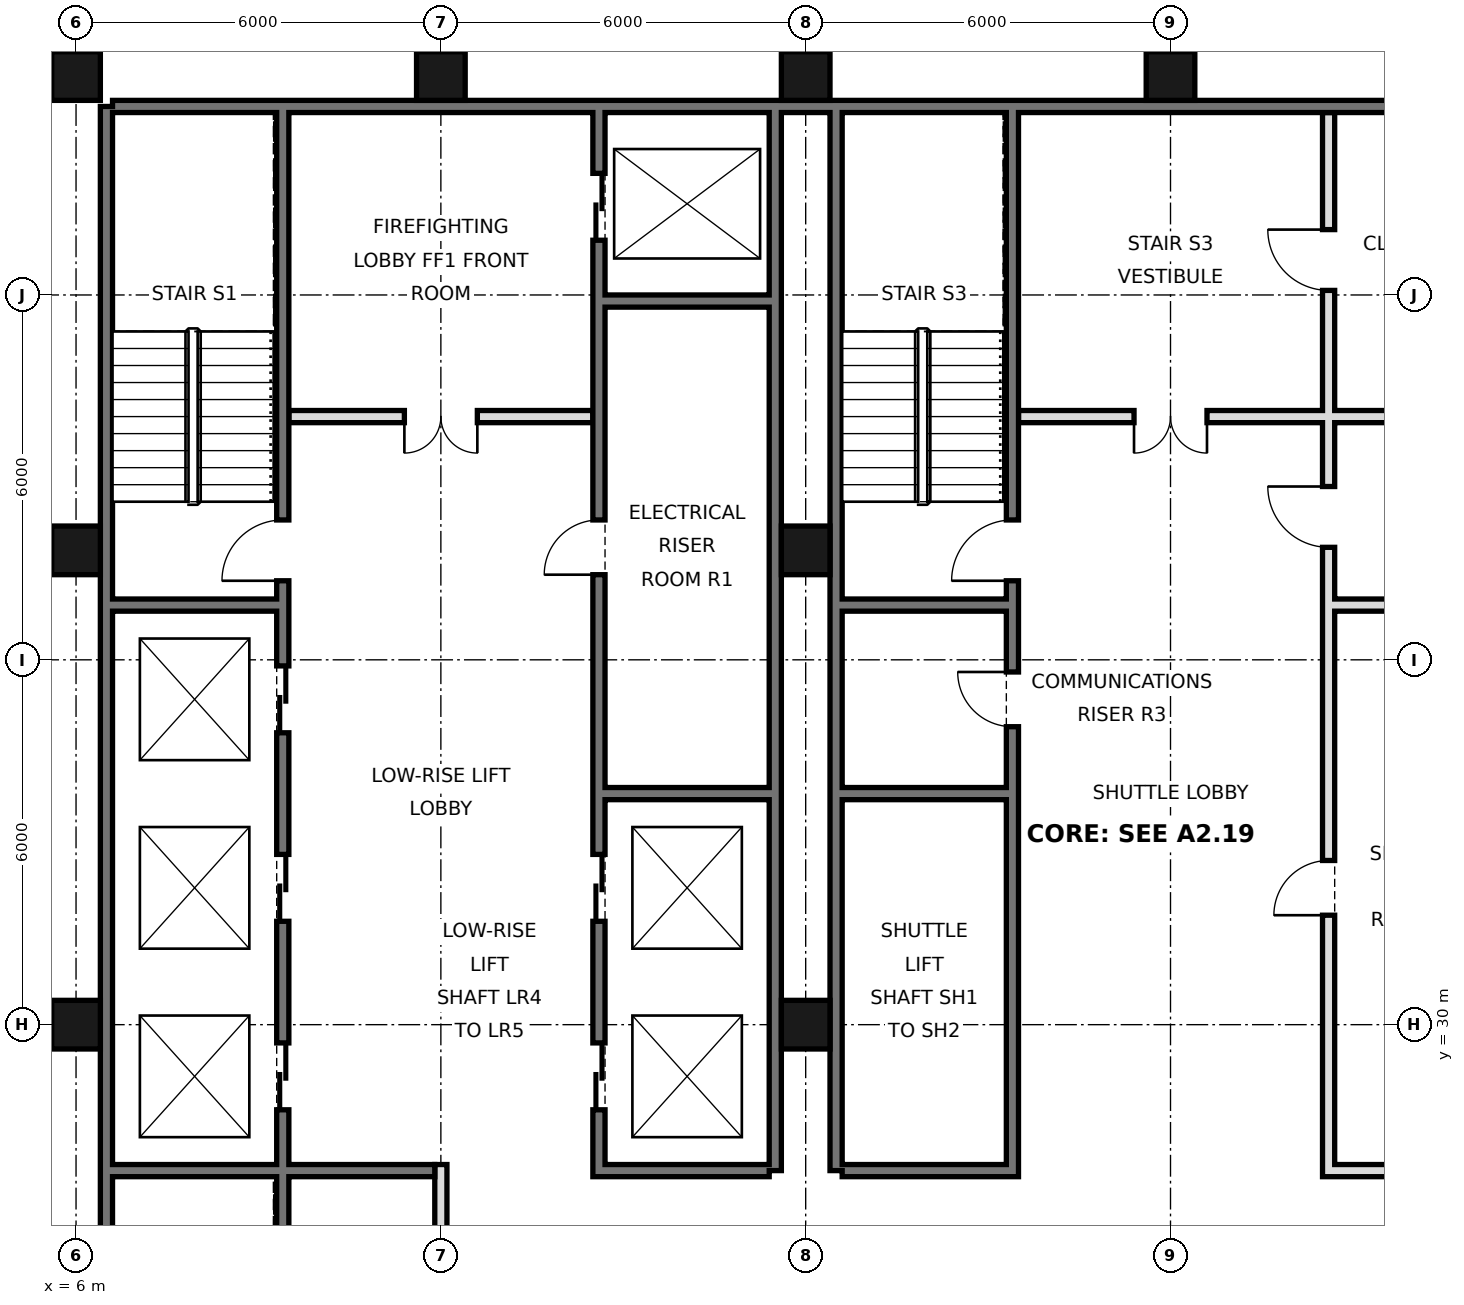
"""IFC4 building model, lengths in metres.
Left out: names, types, materials, properties, quantities, classifications, styles, units other than length and angle.
Written with IfcOpenShell. Run it as: python <this file> out.ifc"""

import sys

from ifc_helpers import new_model, si_unit, direction, frame, frame_2d, origin, origin_2d, place, context, subcontext, project, spatial, rectangle, hollow_rectangle, extrude, element, fill, save


model = new_model("IFC4")
c1 = context("Model", 3, precision=1e-05, world=origin(), true_north=direction((0.0, 1.0)))
c2 = subcontext(c1, "Body", "Model", "MODEL_VIEW")
j1 = project(units=[si_unit("LENGTHUNIT", "METRE"), si_unit("PLANEANGLEUNIT", "RADIAN")], contexts=[c1])
p1 = place(None, origin())
s1 = spatial("IfcSite", under=j1, at=p1, CompositionType="ELEMENT")
p2 = place(p1, origin())
s2 = spatial("IfcBuilding", under=s1, at=p2, CompositionType="ELEMENT")
p3 = place(p2, frame((0.0, 0.0, 75.0)))
s3 = spatial("IfcBuildingStorey", under=s2, at=p3, CompositionType="ELEMENT", Elevation=75.0)
for number, where, z_axis, x_axis in (
    (1, (6.0, 30.0, 0.0), (0.0, 0.0, 1.0), (1.0, 0.0, 0.0)),
    (2, (6.0, 37.8, 0.0), (0.0, 0.0, 1.0), (1.0, 0.0, 0.0)),
    (3, (6.0, 45.6, 0.0), (0.0, 0.0, 1.0), (1.0, 0.0, 0.0)),
    (4, (12.0, 45.6, 0.0), (0.0, 0.0, 1.0), (1.0, 0.0, 0.0)),
    (5, (18.0, 30.0, 0.0), (0.0, 0.0, 1.0), (1.0, 0.0, 0.0)),
    (6, (18.0, 37.8, 0.0), (0.0, 0.0, 1.0), (1.0, 0.0, 0.0)),
    (7, (18.0, 45.6, 0.0), (0.0, 0.0, 1.0), (1.0, 0.0, 0.0)),
    (8, (24.0, 45.6, 0.0), (0.0, 0.0, 1.0), (1.0, 0.0, 0.0)),
):
    element("IfcColumn", number, at=place(p3, frame(where, z_axis=z_axis, x_axis=x_axis)), inside=s3, PredefinedType="COLUMN", context=c2, shape_type="SweptSolid", body=[
        extrude(hollow_rectangle(XDim=0.8, YDim=0.8, WallThickness=0.06, at=origin_2d()), origin(), (0.0, 0.0, 1.0), 3.6),
    ])
p4 = place(p3, frame((6.5, 21.6, 0.0), z_axis=(0.0, 0.0, 1.0), x_axis=(0.0, 1.0, 0.0)))
e9 = element("IfcWall", 9, at=p4, inside=s3, PredefinedType="SOLIDWALL", context=c2, shape_type="SweptSolid", body=[
    extrude(rectangle(XDim=23.5, YDim=0.2, at=frame_2d((11.75, 0.0))), origin(), (0.0, 0.0, 1.0), 3.42),
])
p5 = place(p3, frame((6.6, 45.1, 0.0), z_axis=(0.0, 0.0, 1.0), x_axis=(1.0, 0.0, 0.0)))
e10 = element("IfcWall", 10, at=p5, inside=s3, PredefinedType="SOLIDWALL", context=c2, shape_type="SweptSolid", body=[
    extrude(rectangle(XDim=34.8, YDim=0.2, at=frame_2d((17.4, 0.0))), origin(), (0.0, 0.0, 1.0), 3.42),
])
for number, where, z_axis, x_axis in (
    (11, (17.5, 27.6, 0.0), (0.0, 0.0, 1.0), (0.0, 1.0, 0.0)),
    (12, (18.5, 27.6, 0.0), (0.0, 0.0, 1.0), (0.0, 1.0, 0.0)),
):
    element("IfcWall", number, at=place(p3, frame(where, z_axis=z_axis, x_axis=x_axis)), inside=s3, PredefinedType="SOLIDWALL", context=c2, shape_type="SweptSolid", body=[
        extrude(rectangle(XDim=17.5, YDim=0.2, at=frame_2d((8.75, 0.0))), origin(), (0.0, 0.0, 1.0), 3.42),
    ])
p6 = place(p3, frame((12.0, 21.6, 0.0), z_axis=(0.0, 0.0, 1.0), x_axis=(0.0, 1.0, 0.0)))
e13 = element("IfcWall", 13, at=p6, inside=s3, PredefinedType="PARTITIONING", context=c2, shape_type="SweptSolid", body=[
    extrude(rectangle(XDim=6.1, YDim=0.2, at=frame_2d((3.05, 0.0))), origin(), (0.0, 0.0, 1.0), 3.42),
])
p7 = place(p3, frame((14.6, 27.5, 0.0), z_axis=(0.0, 0.0, 1.0), x_axis=(0.0, 1.0, 0.0)))
e14 = element("IfcWall", 14, at=p7, inside=s3, PredefinedType="SOLIDWALL", context=c2, shape_type="SweptSolid", body=[
    extrude(rectangle(XDim=17.5, YDim=0.2, at=frame_2d((8.75, 0.0))), origin(), (0.0, 0.0, 1.0), 3.42),
])
p8 = place(p7, frame((1.1, 0.0, 0.0)))
e15 = element("IfcOpeningElement", 15, at=p8, cuts=e14, PredefinedType="OPENING", context=c2, shape_type="SweptSolid", body=[
    extrude(rectangle(XDim=1.1, YDim=2.1, at=frame_2d((0.55, 1.05))), frame((0.0, 0.11, 0.0), z_axis=(0.0, -1.0, 0.0), x_axis=(1.0, 0.0, 0.0)), (0.0, 0.0, 1.0), 0.22),
])
p9 = place(p7, frame((4.2, 0.0, 0.0)))
e16 = element("IfcOpeningElement", 16, at=p9, cuts=e14, PredefinedType="OPENING", context=c2, shape_type="SweptSolid", body=[
    extrude(rectangle(XDim=1.1, YDim=2.1, at=frame_2d((0.55, 1.05))), frame((0.0, 0.11, 0.0), z_axis=(0.0, -1.0, 0.0), x_axis=(1.0, 0.0, 0.0)), (0.0, 0.0, 1.0), 0.22),
])
p10 = place(p7, frame((15.4, 0.0, 0.0)))
e17 = element("IfcOpeningElement", 17, at=p10, cuts=e14, PredefinedType="OPENING", context=c2, shape_type="SweptSolid", body=[
    extrude(rectangle(XDim=1.1, YDim=2.1, at=frame_2d((0.55, 1.05))), frame((0.0, 0.11, 0.0), z_axis=(0.0, -1.0, 0.0), x_axis=(1.0, 0.0, 0.0)), (0.0, 0.0, 1.0), 0.22),
])
p11 = place(p7, frame((9.9, 0.0, 0.0)))
e18 = element("IfcOpeningElement", 18, at=p11, cuts=e14, PredefinedType="OPENING", context=c2, shape_type="SweptSolid", body=[
    extrude(rectangle(XDim=0.9, YDim=2.1, at=frame_2d((0.45, 1.05))), frame((0.0, 0.11, 0.0), z_axis=(0.0, -1.0, 0.0), x_axis=(1.0, 0.0, 0.0)), (0.0, 0.0, 1.0), 0.22),
])
p12 = place(p3, frame((21.4, 27.5, 0.0), z_axis=(0.0, 0.0, 1.0), x_axis=(0.0, 1.0, 0.0)))
e19 = element("IfcWall", 19, at=p12, inside=s3, PredefinedType="SOLIDWALL", context=c2, shape_type="SweptSolid", body=[
    extrude(rectangle(XDim=17.5, YDim=0.2, at=frame_2d((8.75, 0.0))), origin(), (0.0, 0.0, 1.0), 3.42),
])
p13 = place(p12, frame((9.8, 0.0, 0.0)))
e20 = element("IfcOpeningElement", 20, at=p13, cuts=e19, PredefinedType="OPENING", context=c2, shape_type="SweptSolid", body=[
    extrude(rectangle(XDim=1.0, YDim=2.1, at=frame_2d((0.5, 1.05))), frame((0.0, 0.11, 0.0), z_axis=(0.0, -1.0, 0.0), x_axis=(1.0, 0.0, 0.0)), (0.0, 0.0, 1.0), 0.22),
])
p14 = place(p12, frame((7.4, 0.0, 0.0)))
e21 = element("IfcOpeningElement", 21, at=p14, cuts=e19, PredefinedType="OPENING", context=c2, shape_type="SweptSolid", body=[
    extrude(rectangle(XDim=0.9, YDim=2.1, at=frame_2d((0.45, 1.05))), frame((0.0, 0.11, 0.0), z_axis=(0.0, -1.0, 0.0), x_axis=(1.0, 0.0, 0.0)), (0.0, 0.0, 1.0), 0.22),
])
p15 = place(p3, frame((26.6, 27.5, 0.0), z_axis=(0.0, 0.0, 1.0), x_axis=(0.0, 1.0, 0.0)))
e22 = element("IfcWall", 22, at=p15, inside=s3, PredefinedType="SOLIDWALL", context=c2, shape_type="SweptSolid", body=[
    extrude(rectangle(XDim=17.5, YDim=0.2, at=frame_2d((8.75, 0.0))), origin(), (0.0, 0.0, 1.0), 3.42),
])
p16 = place(p15, frame((4.3, 0.0, 0.0)))
e23 = element("IfcOpeningElement", 23, at=p16, cuts=e22, PredefinedType="OPENING", context=c2, shape_type="SweptSolid", body=[
    extrude(rectangle(XDim=0.9, YDim=2.1, at=frame_2d((0.45, 1.05))), frame((0.0, 0.11, 0.0), z_axis=(0.0, -1.0, 0.0), x_axis=(1.0, 0.0, 0.0)), (0.0, 0.0, 1.0), 0.22),
])
p17 = place(p15, frame((10.35, 0.0, 0.0)))
e24 = element("IfcOpeningElement", 24, at=p17, cuts=e22, PredefinedType="OPENING", context=c2, shape_type="SweptSolid", body=[
    extrude(rectangle(XDim=1.0, YDim=2.1, at=frame_2d((0.5, 1.05))), frame((0.0, 0.11, 0.0), z_axis=(0.0, -1.0, 0.0), x_axis=(1.0, 0.0, 0.0)), (0.0, 0.0, 1.0), 0.22),
])
p18 = place(p15, frame((14.575, 0.0, 0.0)))
e25 = element("IfcOpeningElement", 25, at=p18, cuts=e22, PredefinedType="OPENING", context=c2, shape_type="SweptSolid", body=[
    extrude(rectangle(XDim=1.0, YDim=2.1, at=frame_2d((0.5, 1.05))), frame((0.0, 0.11, 0.0), z_axis=(0.0, -1.0, 0.0), x_axis=(1.0, 0.0, 0.0)), (0.0, 0.0, 1.0), 0.22),
])
p19 = place(p3, frame((9.4, 21.6, 0.0), z_axis=(0.0, 0.0, 1.0), x_axis=(0.0, 1.0, 0.0)))
e26 = element("IfcWall", 26, at=p19, inside=s3, PredefinedType="SOLIDWALL", context=c2, shape_type="SweptSolid", body=[
    extrude(rectangle(XDim=23.4, YDim=0.2, at=frame_2d((11.7, 0.0))), origin(), (0.0, 0.0, 1.0), 3.42),
])
p20 = place(p19, frame((7.0, 0.0, 0.0)))
e27 = element("IfcOpeningElement", 27, at=p20, cuts=e26, PredefinedType="OPENING", context=c2, shape_type="SweptSolid", body=[
    extrude(rectangle(XDim=1.1, YDim=2.1, at=frame_2d((0.55, 1.05))), frame((0.0, 0.11, 0.0), z_axis=(0.0, -1.0, 0.0), x_axis=(1.0, 0.0, 0.0)), (0.0, 0.0, 1.0), 0.22),
])
p21 = place(p19, frame((10.1, 0.0, 0.0)))
e28 = element("IfcOpeningElement", 28, at=p21, cuts=e26, PredefinedType="OPENING", context=c2, shape_type="SweptSolid", body=[
    extrude(rectangle(XDim=1.1, YDim=2.1, at=frame_2d((0.55, 1.05))), frame((0.0, 0.11, 0.0), z_axis=(0.0, -1.0, 0.0), x_axis=(1.0, 0.0, 0.0)), (0.0, 0.0, 1.0), 0.22),
])
p22 = place(p19, frame((13.2, 0.0, 0.0)))
e29 = element("IfcOpeningElement", 29, at=p22, cuts=e26, PredefinedType="OPENING", context=c2, shape_type="SweptSolid", body=[
    extrude(rectangle(XDim=1.1, YDim=2.1, at=frame_2d((0.55, 1.05))), frame((0.0, 0.11, 0.0), z_axis=(0.0, -1.0, 0.0), x_axis=(1.0, 0.0, 0.0)), (0.0, 0.0, 1.0), 0.22),
])
p23 = place(p19, frame((15.7, 0.0, 0.0)))
e30 = element("IfcOpeningElement", 30, at=p23, cuts=e26, PredefinedType="OPENING", context=c2, shape_type="SweptSolid", body=[
    extrude(rectangle(XDim=1.0, YDim=2.1, at=frame_2d((0.5, 1.05))), frame((0.0, 0.11, 0.0), z_axis=(0.0, -1.0, 0.0), x_axis=(1.0, 0.0, 0.0)), (0.0, 0.0, 1.0), 0.22),
])
p24 = place(p19, frame((0.175, 0.0, 0.0)))
e31 = element("IfcOpeningElement", 31, at=p24, cuts=e26, PredefinedType="OPENING", context=c2, shape_type="SweptSolid", body=[
    extrude(rectangle(XDim=0.9, YDim=2.1, at=frame_2d((0.45, 1.05))), frame((0.0, 0.11, 0.0), z_axis=(0.0, -1.0, 0.0), x_axis=(1.0, 0.0, 0.0)), (0.0, 0.0, 1.0), 0.22),
])
for number, where, z_axis, x_axis in (
    (32, (14.7, 27.6, 0.0), (0.0, 0.0, 1.0), (1.0, 0.0, 0.0)),
    (33, (18.6, 27.6, 0.0), (0.0, 0.0, 1.0), (1.0, 0.0, 0.0)),
    (34, (26.7, 27.6, 0.0), (0.0, 0.0, 1.0), (1.0, 0.0, 0.0)),
):
    element("IfcWall", number, at=place(p3, frame(where, z_axis=z_axis, x_axis=x_axis)), inside=s3, PredefinedType="SOLIDWALL", context=c2, shape_type="SweptSolid", body=[
        extrude(rectangle(XDim=2.7, YDim=0.2, at=frame_2d((1.35, 0.0))), origin(), (0.0, 0.0, 1.0), 3.42),
    ])
p25 = place(p3, frame((6.6, 27.6, 0.0), z_axis=(0.0, 0.0, 1.0), x_axis=(1.0, 0.0, 0.0)))
e35 = element("IfcWall", 35, at=p25, inside=s3, PredefinedType="SOLIDWALL", context=c2, shape_type="SweptSolid", body=[
    extrude(rectangle(XDim=5.3, YDim=0.2, at=frame_2d((2.65, 0.0))), origin(), (0.0, 0.0, 1.0), 3.42),
])
for number, where, z_axis, x_axis in (
    (36, (14.7, 33.8, 0.0), (0.0, 0.0, 1.0), (1.0, 0.0, 0.0)),
    (37, (18.6, 33.8, 0.0), (0.0, 0.0, 1.0), (1.0, 0.0, 0.0)),
    (38, (18.6, 36.9, 0.0), (0.0, 0.0, 1.0), (1.0, 0.0, 0.0)),
    (39, (26.7, 36.9, 0.0), (0.0, 0.0, 1.0), (1.0, 0.0, 0.0)),
    (40, (6.6, 36.9, 0.0), (0.0, 0.0, 1.0), (1.0, 0.0, 0.0)),
):
    element("IfcWall", number, at=place(p3, frame(where, z_axis=z_axis, x_axis=x_axis)), inside=s3, PredefinedType="SOLIDWALL", context=c2, shape_type="SweptSolid", body=[
        extrude(rectangle(XDim=2.7, YDim=0.2, at=frame_2d((1.35, 0.0))), origin(), (0.0, 0.0, 1.0), 3.42),
    ])
p26 = place(p3, frame((21.5, 40.0, 0.0), z_axis=(0.0, 0.0, 1.0), x_axis=(1.0, 0.0, 0.0)))
e41 = element("IfcWall", 41, at=p26, inside=s3, PredefinedType="PARTITIONING", context=c2, shape_type="SweptSolid", body=[
    extrude(rectangle(XDim=7.9, YDim=0.2, at=frame_2d((3.95, 0.0))), origin(), (0.0, 0.0, 1.0), 3.42),
])
p27 = place(p26, frame((1.9, 0.0, 0.0)))
e42 = element("IfcOpeningElement", 42, at=p27, cuts=e41, PredefinedType="OPENING", context=c2, shape_type="SweptSolid", body=[
    extrude(rectangle(XDim=1.2, YDim=2.1, at=frame_2d((0.6, 1.05))), frame((0.0, 0.11, 0.0), z_axis=(0.0, -1.0, 0.0), x_axis=(1.0, 0.0, 0.0)), (0.0, 0.0, 1.0), 0.22),
])
p28 = place(p3, frame((9.5, 40.0, 0.0), z_axis=(0.0, 0.0, 1.0), x_axis=(1.0, 0.0, 0.0)))
e43 = element("IfcWall", 43, at=p28, inside=s3, PredefinedType="PARTITIONING", context=c2, shape_type="SweptSolid", body=[
    extrude(rectangle(XDim=5.0, YDim=0.2, at=frame_2d((2.5, 0.0))), origin(), (0.0, 0.0, 1.0), 3.42),
])
p29 = place(p28, frame((1.9, 0.0, 0.0)))
e44 = element("IfcOpeningElement", 44, at=p29, cuts=e43, PredefinedType="OPENING", context=c2, shape_type="SweptSolid", body=[
    extrude(rectangle(XDim=1.2, YDim=2.1, at=frame_2d((0.6, 1.05))), frame((0.0, 0.11, 0.0), z_axis=(0.0, -1.0, 0.0), x_axis=(1.0, 0.0, 0.0)), (0.0, 0.0, 1.0), 0.22),
])
p30 = place(p3, frame((14.7, 41.9, 0.0), z_axis=(0.0, 0.0, 1.0), x_axis=(1.0, 0.0, 0.0)))
e45 = element("IfcWall", 45, at=p30, inside=s3, PredefinedType="SOLIDWALL", context=c2, shape_type="SweptSolid", body=[
    extrude(rectangle(XDim=2.7, YDim=0.2, at=frame_2d((1.35, 0.0))), origin(), (0.0, 0.0, 1.0), 3.42),
])
p31 = place(p29, frame((1.2, 0.0, 0.0), z_axis=(0.0, 0.0, 1.0), x_axis=(-1.0, 0.0, 0.0)))
e46 = element("IfcDoor", 46, at=p31, inside=s3, OperationType="DOUBLE_DOOR_SINGLE_SWING", PredefinedType="DOOR", context=c2, shape_type="SweptSolid", body=[
    extrude(rectangle(XDim=1.2, YDim=2.1, at=frame_2d((0.6, 1.05))), frame((0.0, 0.025, 0.0), z_axis=(0.0, -1.0, 0.0), x_axis=(1.0, 0.0, 0.0)), (0.0, 0.0, 1.0), 0.05),
])
fill(e44, e46)
p32 = place(p27, frame((1.2, 0.0, 0.0), z_axis=(0.0, 0.0, 1.0), x_axis=(-1.0, 0.0, 0.0)))
e47 = element("IfcDoor", 47, at=p32, inside=s3, OperationType="DOUBLE_DOOR_SINGLE_SWING", PredefinedType="DOOR", context=c2, shape_type="SweptSolid", body=[
    extrude(rectangle(XDim=1.2, YDim=2.1, at=frame_2d((0.6, 1.05))), frame((0.0, 0.025, 0.0), z_axis=(0.0, -1.0, 0.0), x_axis=(1.0, 0.0, 0.0)), (0.0, 0.0, 1.0), 0.05),
])
fill(e42, e47)
p33 = place(p8, origin())
e48 = element("IfcDoor", 48, at=p33, inside=s3, OperationType="DOUBLE_DOOR_SLIDING", PredefinedType="DOOR", context=c2, shape_type="SweptSolid", body=[
    extrude(rectangle(XDim=1.1, YDim=2.1, at=frame_2d((0.55, 1.05))), frame((0.0, 0.025, 0.0), z_axis=(0.0, -1.0, 0.0), x_axis=(1.0, 0.0, 0.0)), (0.0, 0.0, 1.0), 0.05),
])
fill(e15, e48)
p34 = place(p9, origin())
e49 = element("IfcDoor", 49, at=p34, inside=s3, OperationType="DOUBLE_DOOR_SLIDING", PredefinedType="DOOR", context=c2, shape_type="SweptSolid", body=[
    extrude(rectangle(XDim=1.1, YDim=2.1, at=frame_2d((0.55, 1.05))), frame((0.0, 0.025, 0.0), z_axis=(0.0, -1.0, 0.0), x_axis=(1.0, 0.0, 0.0)), (0.0, 0.0, 1.0), 0.05),
])
fill(e16, e49)
p35 = place(p10, origin())
e50 = element("IfcDoor", 50, at=p35, inside=s3, OperationType="DOUBLE_DOOR_SLIDING", PredefinedType="DOOR", context=c2, shape_type="SweptSolid", body=[
    extrude(rectangle(XDim=1.1, YDim=2.1, at=frame_2d((0.55, 1.05))), frame((0.0, 0.025, 0.0), z_axis=(0.0, -1.0, 0.0), x_axis=(1.0, 0.0, 0.0)), (0.0, 0.0, 1.0), 0.05),
])
fill(e17, e50)
p36 = place(p20, origin())
e51 = element("IfcDoor", 51, at=p36, inside=s3, OperationType="DOUBLE_DOOR_SLIDING", PredefinedType="DOOR", context=c2, shape_type="SweptSolid", body=[
    extrude(rectangle(XDim=1.1, YDim=2.1, at=frame_2d((0.55, 1.05))), frame((0.0, 0.025, 0.0), z_axis=(0.0, -1.0, 0.0), x_axis=(1.0, 0.0, 0.0)), (0.0, 0.0, 1.0), 0.05),
])
fill(e27, e51)
p37 = place(p21, origin())
e52 = element("IfcDoor", 52, at=p37, inside=s3, OperationType="DOUBLE_DOOR_SLIDING", PredefinedType="DOOR", context=c2, shape_type="SweptSolid", body=[
    extrude(rectangle(XDim=1.1, YDim=2.1, at=frame_2d((0.55, 1.05))), frame((0.0, 0.025, 0.0), z_axis=(0.0, -1.0, 0.0), x_axis=(1.0, 0.0, 0.0)), (0.0, 0.0, 1.0), 0.05),
])
fill(e28, e52)
p38 = place(p22, origin())
e53 = element("IfcDoor", 53, at=p38, inside=s3, OperationType="DOUBLE_DOOR_SLIDING", PredefinedType="DOOR", context=c2, shape_type="SweptSolid", body=[
    extrude(rectangle(XDim=1.1, YDim=2.1, at=frame_2d((0.55, 1.05))), frame((0.0, 0.025, 0.0), z_axis=(0.0, -1.0, 0.0), x_axis=(1.0, 0.0, 0.0)), (0.0, 0.0, 1.0), 0.05),
])
fill(e29, e53)
p39 = place(p23, origin())
e54 = element("IfcDoor", 54, at=p39, inside=s3, OperationType="SINGLE_SWING_LEFT", PredefinedType="DOOR", context=c2, shape_type="SweptSolid", body=[
    extrude(rectangle(XDim=1.0, YDim=2.1, at=frame_2d((0.5, 1.05))), frame((0.0, 0.025, 0.0), z_axis=(0.0, -1.0, 0.0), x_axis=(1.0, 0.0, 0.0)), (0.0, 0.0, 1.0), 0.05),
])
fill(e30, e54)
p40 = place(p13, origin())
e55 = element("IfcDoor", 55, at=p40, inside=s3, OperationType="SINGLE_SWING_LEFT", PredefinedType="DOOR", context=c2, shape_type="SweptSolid", body=[
    extrude(rectangle(XDim=1.0, YDim=2.1, at=frame_2d((0.5, 1.05))), frame((0.0, 0.025, 0.0), z_axis=(0.0, -1.0, 0.0), x_axis=(1.0, 0.0, 0.0)), (0.0, 0.0, 1.0), 0.05),
])
fill(e20, e55)
p41 = place(p11, origin())
e56 = element("IfcDoor", 56, at=p41, inside=s3, OperationType="SINGLE_SWING_LEFT", PredefinedType="DOOR", context=c2, shape_type="SweptSolid", body=[
    extrude(rectangle(XDim=0.9, YDim=2.1, at=frame_2d((0.45, 1.05))), frame((0.0, 0.025, 0.0), z_axis=(0.0, -1.0, 0.0), x_axis=(1.0, 0.0, 0.0)), (0.0, 0.0, 1.0), 0.05),
])
fill(e18, e56)
p42 = place(p14, frame((0.9, 0.0, 0.0), z_axis=(0.0, 0.0, 1.0), x_axis=(-1.0, 0.0, 0.0)))
e57 = element("IfcDoor", 57, at=p42, inside=s3, OperationType="SINGLE_SWING_LEFT", PredefinedType="DOOR", context=c2, shape_type="SweptSolid", body=[
    extrude(rectangle(XDim=0.9, YDim=2.1, at=frame_2d((0.45, 1.05))), frame((0.0, 0.025, 0.0), z_axis=(0.0, -1.0, 0.0), x_axis=(1.0, 0.0, 0.0)), (0.0, 0.0, 1.0), 0.05),
])
fill(e21, e57)
p43 = place(p16, origin())
e58 = element("IfcDoor", 58, at=p43, inside=s3, OperationType="SINGLE_SWING_LEFT", PredefinedType="DOOR", context=c2, shape_type="SweptSolid", body=[
    extrude(rectangle(XDim=0.9, YDim=2.1, at=frame_2d((0.45, 1.05))), frame((0.0, 0.025, 0.0), z_axis=(0.0, -1.0, 0.0), x_axis=(1.0, 0.0, 0.0)), (0.0, 0.0, 1.0), 0.05),
])
fill(e23, e58)
p44 = place(p17, frame((1.0, 0.0, 0.0), z_axis=(0.0, 0.0, 1.0), x_axis=(-1.0, 0.0, 0.0)))
e59 = element("IfcDoor", 59, at=p44, inside=s3, OperationType="SINGLE_SWING_LEFT", PredefinedType="DOOR", context=c2, shape_type="SweptSolid", body=[
    extrude(rectangle(XDim=1.0, YDim=2.1, at=frame_2d((0.5, 1.05))), frame((0.0, 0.025, 0.0), z_axis=(0.0, -1.0, 0.0), x_axis=(1.0, 0.0, 0.0)), (0.0, 0.0, 1.0), 0.05),
])
fill(e24, e59)
p45 = place(p18, frame((1.0, 0.0, 0.0), z_axis=(0.0, 0.0, 1.0), x_axis=(-1.0, 0.0, 0.0)))
e60 = element("IfcDoor", 60, at=p45, inside=s3, OperationType="SINGLE_SWING_LEFT", PredefinedType="DOOR", context=c2, shape_type="SweptSolid", body=[
    extrude(rectangle(XDim=1.0, YDim=2.1, at=frame_2d((0.5, 1.05))), frame((0.0, 0.025, 0.0), z_axis=(0.0, -1.0, 0.0), x_axis=(1.0, 0.0, 0.0)), (0.0, 0.0, 1.0), 0.05),
])
fill(e25, e60)
save(model, sys.argv[1])
